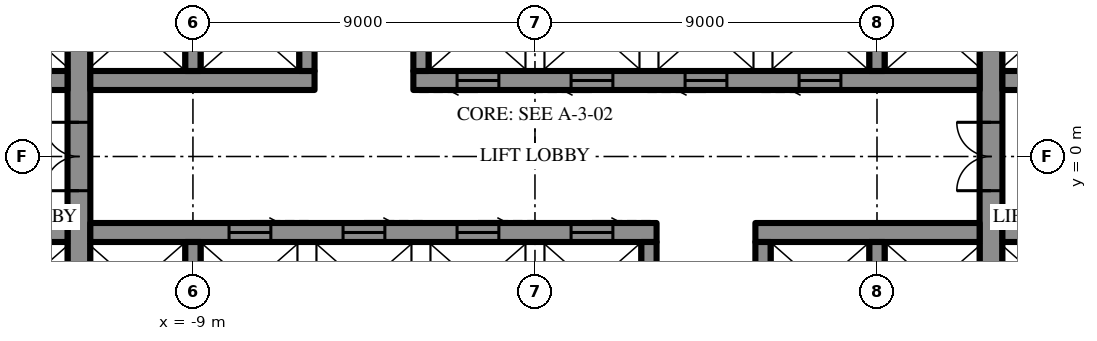
"""IFC4 building model, lengths in metres.
Left out: names, types, materials, properties, quantities, classifications, styles, units other than length and angle.
Written with IfcOpenShell. Run it as: python <this file> out.ifc"""

import sys

from ifc_helpers import new_model, si_unit, direction, frame, frame_2d, origin, place, context, subcontext, project, spatial, rectangle, extrude, element, fill, save


model = new_model("IFC4")
c1 = context("Model", 3, precision=1e-05, world=origin(), true_north=direction((0.0, 1.0)))
c2 = subcontext(c1, "Body", "Model", "MODEL_VIEW")
j1 = project(units=[si_unit("LENGTHUNIT", "METRE"), si_unit("PLANEANGLEUNIT", "RADIAN")], contexts=[c1])
p1 = place(None, origin())
s1 = spatial("IfcSite", under=j1, at=p1, CompositionType="ELEMENT")
p2 = place(p1, origin())
s2 = spatial("IfcBuilding", under=s1, at=p2, CompositionType="ELEMENT")
p3 = place(p2, frame((0.0, 0.0, 169.9)))
s3 = spatial("IfcBuildingStorey", under=s2, at=p3, CompositionType="ELEMENT", Elevation=169.9)
p4 = place(p3, frame((12.0, -10.7, 0.0), z_axis=(0.0, 0.0, 1.0), x_axis=(0.0, 1.0, 0.0)))
e1 = element("IfcWall", 1, at=p4, inside=s3, PredefinedType="SHEAR", context=c2, shape_type="SweptSolid", body=[
    extrude(rectangle(XDim=21.4, YDim=0.6, at=frame_2d((10.7, 0.0))), origin(), (0.0, 0.0, 1.0), 4.2),
])
p5 = place(p4, frame((9.8, 0.0, 0.0)))
e2 = element("IfcOpeningElement", 2, at=p5, cuts=e1, PredefinedType="OPENING", context=c2, shape_type="SweptSolid", body=[
    extrude(rectangle(XDim=1.8, YDim=2.4, at=frame_2d((0.9, 1.2))), frame((0.0, 0.31, 0.0), z_axis=(0.0, -1.0, 0.0), x_axis=(1.0, 0.0, 0.0)), (0.0, 0.0, 1.0), 0.62),
])
p6 = place(p3, frame((-12.0, -10.7, 0.0), z_axis=(0.0, 0.0, 1.0), x_axis=(0.0, 1.0, 0.0)))
e3 = element("IfcWall", 3, at=p6, inside=s3, PredefinedType="SHEAR", context=c2, shape_type="SweptSolid", body=[
    extrude(rectangle(XDim=21.4, YDim=0.6, at=frame_2d((10.7, 0.0))), origin(), (0.0, 0.0, 1.0), 4.2),
])
p7 = place(p6, frame((9.8, 0.0, 0.0)))
e4 = element("IfcOpeningElement", 4, at=p7, cuts=e3, PredefinedType="OPENING", context=c2, shape_type="SweptSolid", body=[
    extrude(rectangle(XDim=1.8, YDim=2.4, at=frame_2d((0.9, 1.2))), frame((0.0, 0.31, 0.0), z_axis=(0.0, -1.0, 0.0), x_axis=(1.0, 0.0, 0.0)), (0.0, 0.0, 1.0), 0.62),
])
p8 = place(p3, frame((-14.7, 2.0, 0.0), z_axis=(0.0, 0.0, 1.0), x_axis=(1.0, 0.0, 0.0)))
e5 = element("IfcWall", 5, at=p8, inside=s3, PredefinedType="SHEAR", context=c2, shape_type="SweptSolid", body=[
    extrude(rectangle(XDim=2.4, YDim=0.5, at=frame_2d((1.2, 0.0))), origin(), (0.0, 0.0, 1.0), 4.2),
])
p9 = place(p3, frame((-11.7, 2.0, 0.0), z_axis=(0.0, 0.0, 1.0), x_axis=(1.0, 0.0, 0.0)))
e6 = element("IfcWall", 6, at=p9, inside=s3, PredefinedType="SHEAR", context=c2, shape_type="SweptSolid", body=[
    extrude(rectangle(XDim=5.9, YDim=0.5, at=frame_2d((2.95, 0.0))), origin(), (0.0, 0.0, 1.0), 4.2),
])
p10 = place(p3, frame((-3.2, 2.0, 0.0), z_axis=(0.0, 0.0, 1.0), x_axis=(1.0, 0.0, 0.0)))
e7 = element("IfcWall", 7, at=p10, inside=s3, PredefinedType="SHEAR", context=c2, shape_type="SweptSolid", body=[
    extrude(rectangle(XDim=14.9, YDim=0.5, at=frame_2d((7.45, 0.0))), origin(), (0.0, 0.0, 1.0), 4.2),
])
p11 = place(p10, frame((1.15, 0.0, 0.0)))
e8 = element("IfcOpeningElement", 8, at=p11, cuts=e7, PredefinedType="OPENING", context=c2, shape_type="SweptSolid", body=[
    extrude(rectangle(XDim=1.1, YDim=2.2, at=frame_2d((0.55, 1.1))), frame((0.0, 0.26, 0.0), z_axis=(0.0, -1.0, 0.0), x_axis=(1.0, 0.0, 0.0)), (0.0, 0.0, 1.0), 0.52),
])
p12 = place(p10, frame((4.15, 0.0, 0.0)))
e9 = element("IfcOpeningElement", 9, at=p12, cuts=e7, PredefinedType="OPENING", context=c2, shape_type="SweptSolid", body=[
    extrude(rectangle(XDim=1.1, YDim=2.2, at=frame_2d((0.55, 1.1))), frame((0.0, 0.26, 0.0), z_axis=(0.0, -1.0, 0.0), x_axis=(1.0, 0.0, 0.0)), (0.0, 0.0, 1.0), 0.52),
])
p13 = place(p10, frame((7.15, 0.0, 0.0)))
e10 = element("IfcOpeningElement", 10, at=p13, cuts=e7, PredefinedType="OPENING", context=c2, shape_type="SweptSolid", body=[
    extrude(rectangle(XDim=1.1, YDim=2.2, at=frame_2d((0.55, 1.1))), frame((0.0, 0.26, 0.0), z_axis=(0.0, -1.0, 0.0), x_axis=(1.0, 0.0, 0.0)), (0.0, 0.0, 1.0), 0.52),
])
p14 = place(p10, frame((10.15, 0.0, 0.0)))
e11 = element("IfcOpeningElement", 11, at=p14, cuts=e7, PredefinedType="OPENING", context=c2, shape_type="SweptSolid", body=[
    extrude(rectangle(XDim=1.1, YDim=2.2, at=frame_2d((0.55, 1.1))), frame((0.0, 0.26, 0.0), z_axis=(0.0, -1.0, 0.0), x_axis=(1.0, 0.0, 0.0)), (0.0, 0.0, 1.0), 0.52),
])
p15 = place(p3, frame((12.3, 2.0, 0.0), z_axis=(0.0, 0.0, 1.0), x_axis=(1.0, 0.0, 0.0)))
e12 = element("IfcWall", 12, at=p15, inside=s3, PredefinedType="SHEAR", context=c2, shape_type="SweptSolid", body=[
    extrude(rectangle(XDim=2.4, YDim=0.5, at=frame_2d((1.2, 0.0))), origin(), (0.0, 0.0, 1.0), 4.2),
])
for number, where, z_axis, x_axis in (
    (13, (-9.0, 2.25, 0.0), (0.0, 0.0, 1.0), (0.0, 1.0, 0.0)),
    (14, (-6.0, 2.25, 0.0), (0.0, 0.0, 1.0), (0.0, 1.0, 0.0)),
    (15, (-3.0, 2.25, 0.0), (0.0, 0.0, 1.0), (0.0, 1.0, 0.0)),
    (16, (9.0, 2.25, 0.0), (0.0, 0.0, 1.0), (0.0, 1.0, 0.0)),
):
    element("IfcWall", number, at=place(p3, frame(where, z_axis=z_axis, x_axis=x_axis)), inside=s3, PredefinedType="SHEAR", context=c2, shape_type="SweptSolid", body=[
        extrude(rectangle(XDim=2.3, YDim=0.4, at=frame_2d((1.15, 0.0))), origin(), (0.0, 0.0, 1.0), 4.2),
    ])
p16 = place(p3, frame((14.7, -2.0, 0.0), z_axis=(0.0, 0.0, 1.0), x_axis=(-1.0, 0.0, 0.0)))
e17 = element("IfcWall", 17, at=p16, inside=s3, PredefinedType="SHEAR", context=c2, shape_type="SweptSolid", body=[
    extrude(rectangle(XDim=2.4, YDim=0.5, at=frame_2d((1.2, 0.0))), origin(), (0.0, 0.0, 1.0), 4.2),
])
p17 = place(p3, frame((11.7, -2.0, 0.0), z_axis=(0.0, 0.0, 1.0), x_axis=(-1.0, 0.0, 0.0)))
e18 = element("IfcWall", 18, at=p17, inside=s3, PredefinedType="SHEAR", context=c2, shape_type="SweptSolid", body=[
    extrude(rectangle(XDim=5.9, YDim=0.5, at=frame_2d((2.95, 0.0))), origin(), (0.0, 0.0, 1.0), 4.2),
])
p18 = place(p3, frame((3.2, -2.0, 0.0), z_axis=(0.0, 0.0, 1.0), x_axis=(-1.0, 0.0, 0.0)))
e19 = element("IfcWall", 19, at=p18, inside=s3, PredefinedType="SHEAR", context=c2, shape_type="SweptSolid", body=[
    extrude(rectangle(XDim=14.9, YDim=0.5, at=frame_2d((7.45, 0.0))), origin(), (0.0, 0.0, 1.0), 4.2),
])
p19 = place(p18, frame((1.15, 0.0, 0.0)))
e20 = element("IfcOpeningElement", 20, at=p19, cuts=e19, PredefinedType="OPENING", context=c2, shape_type="SweptSolid", body=[
    extrude(rectangle(XDim=1.1, YDim=2.2, at=frame_2d((0.55, 1.1))), frame((0.0, 0.26, 0.0), z_axis=(0.0, -1.0, 0.0), x_axis=(1.0, 0.0, 0.0)), (0.0, 0.0, 1.0), 0.52),
])
p20 = place(p18, frame((4.15, 0.0, 0.0)))
e21 = element("IfcOpeningElement", 21, at=p20, cuts=e19, PredefinedType="OPENING", context=c2, shape_type="SweptSolid", body=[
    extrude(rectangle(XDim=1.1, YDim=2.2, at=frame_2d((0.55, 1.1))), frame((0.0, 0.26, 0.0), z_axis=(0.0, -1.0, 0.0), x_axis=(1.0, 0.0, 0.0)), (0.0, 0.0, 1.0), 0.52),
])
p21 = place(p18, frame((7.15, 0.0, 0.0)))
e22 = element("IfcOpeningElement", 22, at=p21, cuts=e19, PredefinedType="OPENING", context=c2, shape_type="SweptSolid", body=[
    extrude(rectangle(XDim=1.1, YDim=2.2, at=frame_2d((0.55, 1.1))), frame((0.0, 0.26, 0.0), z_axis=(0.0, -1.0, 0.0), x_axis=(1.0, 0.0, 0.0)), (0.0, 0.0, 1.0), 0.52),
])
p22 = place(p18, frame((10.15, 0.0, 0.0)))
e23 = element("IfcOpeningElement", 23, at=p22, cuts=e19, PredefinedType="OPENING", context=c2, shape_type="SweptSolid", body=[
    extrude(rectangle(XDim=1.1, YDim=2.2, at=frame_2d((0.55, 1.1))), frame((0.0, 0.26, 0.0), z_axis=(0.0, -1.0, 0.0), x_axis=(1.0, 0.0, 0.0)), (0.0, 0.0, 1.0), 0.52),
])
p23 = place(p3, frame((-12.3, -2.0, 0.0), z_axis=(0.0, 0.0, 1.0), x_axis=(-1.0, 0.0, 0.0)))
e24 = element("IfcWall", 24, at=p23, inside=s3, PredefinedType="SHEAR", context=c2, shape_type="SweptSolid", body=[
    extrude(rectangle(XDim=2.4, YDim=0.5, at=frame_2d((1.2, 0.0))), origin(), (0.0, 0.0, 1.0), 4.2),
])
for number, where, z_axis, x_axis in (
    (25, (9.0, -2.25, 0.0), (0.0, 0.0, 1.0), (0.0, -1.0, 0.0)),
    (26, (6.0, -2.25, 0.0), (0.0, 0.0, 1.0), (0.0, -1.0, 0.0)),
    (27, (3.0, -2.25, 0.0), (0.0, 0.0, 1.0), (0.0, -1.0, 0.0)),
    (28, (-9.0, -2.25, 0.0), (0.0, 0.0, 1.0), (0.0, -1.0, 0.0)),
):
    element("IfcWall", number, at=place(p3, frame(where, z_axis=z_axis, x_axis=x_axis)), inside=s3, PredefinedType="SHEAR", context=c2, shape_type="SweptSolid", body=[
        extrude(rectangle(XDim=2.3, YDim=0.4, at=frame_2d((1.15, 0.0))), origin(), (0.0, 0.0, 1.0), 4.2),
    ])
p24 = place(p5, origin())
e29 = element("IfcDoor", 29, at=p24, inside=s3, OperationType="DOUBLE_DOOR_SINGLE_SWING", PredefinedType="DOOR", context=c2, shape_type="SweptSolid", body=[
    extrude(rectangle(XDim=1.8, YDim=2.4, at=frame_2d((0.9, 1.2))), frame((0.0, 0.025, 0.0), z_axis=(0.0, -1.0, 0.0), x_axis=(1.0, 0.0, 0.0)), (0.0, 0.0, 1.0), 0.05),
])
fill(e2, e29)
p25 = place(p7, origin())
e30 = element("IfcDoor", 30, at=p25, inside=s3, OperationType="DOUBLE_DOOR_SINGLE_SWING", PredefinedType="DOOR", context=c2, shape_type="SweptSolid", body=[
    extrude(rectangle(XDim=1.8, YDim=2.4, at=frame_2d((0.9, 1.2))), frame((0.0, 0.025, 0.0), z_axis=(0.0, -1.0, 0.0), x_axis=(1.0, 0.0, 0.0)), (0.0, 0.0, 1.0), 0.05),
])
fill(e4, e30)
p26 = place(p11, frame((1.1, 0.0, 0.0), z_axis=(0.0, 0.0, 1.0), x_axis=(-1.0, 0.0, 0.0)))
e31 = element("IfcDoor", 31, at=p26, inside=s3, OperationType="SLIDING_TO_LEFT", PredefinedType="DOOR", context=c2, shape_type="SweptSolid", body=[
    extrude(rectangle(XDim=1.1, YDim=2.2, at=frame_2d((0.55, 1.1))), frame((0.0, 0.025, 0.0), z_axis=(0.0, -1.0, 0.0), x_axis=(1.0, 0.0, 0.0)), (0.0, 0.0, 1.0), 0.05),
])
fill(e8, e31)
p27 = place(p12, frame((1.1, 0.0, 0.0), z_axis=(0.0, 0.0, 1.0), x_axis=(-1.0, 0.0, 0.0)))
e32 = element("IfcDoor", 32, at=p27, inside=s3, OperationType="SLIDING_TO_LEFT", PredefinedType="DOOR", context=c2, shape_type="SweptSolid", body=[
    extrude(rectangle(XDim=1.1, YDim=2.2, at=frame_2d((0.55, 1.1))), frame((0.0, 0.025, 0.0), z_axis=(0.0, -1.0, 0.0), x_axis=(1.0, 0.0, 0.0)), (0.0, 0.0, 1.0), 0.05),
])
fill(e9, e32)
p28 = place(p13, frame((1.1, 0.0, 0.0), z_axis=(0.0, 0.0, 1.0), x_axis=(-1.0, 0.0, 0.0)))
e33 = element("IfcDoor", 33, at=p28, inside=s3, OperationType="SLIDING_TO_LEFT", PredefinedType="DOOR", context=c2, shape_type="SweptSolid", body=[
    extrude(rectangle(XDim=1.1, YDim=2.2, at=frame_2d((0.55, 1.1))), frame((0.0, 0.025, 0.0), z_axis=(0.0, -1.0, 0.0), x_axis=(1.0, 0.0, 0.0)), (0.0, 0.0, 1.0), 0.05),
])
fill(e10, e33)
p29 = place(p14, frame((1.1, 0.0, 0.0), z_axis=(0.0, 0.0, 1.0), x_axis=(-1.0, 0.0, 0.0)))
e34 = element("IfcDoor", 34, at=p29, inside=s3, OperationType="SLIDING_TO_LEFT", PredefinedType="DOOR", context=c2, shape_type="SweptSolid", body=[
    extrude(rectangle(XDim=1.1, YDim=2.2, at=frame_2d((0.55, 1.1))), frame((0.0, 0.025, 0.0), z_axis=(0.0, -1.0, 0.0), x_axis=(1.0, 0.0, 0.0)), (0.0, 0.0, 1.0), 0.05),
])
fill(e11, e34)
p30 = place(p19, frame((1.1, 0.0, 0.0), z_axis=(0.0, 0.0, 1.0), x_axis=(-1.0, 0.0, 0.0)))
e35 = element("IfcDoor", 35, at=p30, inside=s3, OperationType="SLIDING_TO_LEFT", PredefinedType="DOOR", context=c2, shape_type="SweptSolid", body=[
    extrude(rectangle(XDim=1.1, YDim=2.2, at=frame_2d((0.55, 1.1))), frame((0.0, 0.025, 0.0), z_axis=(0.0, -1.0, 0.0), x_axis=(1.0, 0.0, 0.0)), (0.0, 0.0, 1.0), 0.05),
])
fill(e20, e35)
p31 = place(p20, frame((1.1, 0.0, 0.0), z_axis=(0.0, 0.0, 1.0), x_axis=(-1.0, 0.0, 0.0)))
e36 = element("IfcDoor", 36, at=p31, inside=s3, OperationType="SLIDING_TO_LEFT", PredefinedType="DOOR", context=c2, shape_type="SweptSolid", body=[
    extrude(rectangle(XDim=1.1, YDim=2.2, at=frame_2d((0.55, 1.1))), frame((0.0, 0.025, 0.0), z_axis=(0.0, -1.0, 0.0), x_axis=(1.0, 0.0, 0.0)), (0.0, 0.0, 1.0), 0.05),
])
fill(e21, e36)
p32 = place(p21, frame((1.1, 0.0, 0.0), z_axis=(0.0, 0.0, 1.0), x_axis=(-1.0, 0.0, 0.0)))
e37 = element("IfcDoor", 37, at=p32, inside=s3, OperationType="SLIDING_TO_LEFT", PredefinedType="DOOR", context=c2, shape_type="SweptSolid", body=[
    extrude(rectangle(XDim=1.1, YDim=2.2, at=frame_2d((0.55, 1.1))), frame((0.0, 0.025, 0.0), z_axis=(0.0, -1.0, 0.0), x_axis=(1.0, 0.0, 0.0)), (0.0, 0.0, 1.0), 0.05),
])
fill(e22, e37)
p33 = place(p22, frame((1.1, 0.0, 0.0), z_axis=(0.0, 0.0, 1.0), x_axis=(-1.0, 0.0, 0.0)))
e38 = element("IfcDoor", 38, at=p33, inside=s3, OperationType="SLIDING_TO_LEFT", PredefinedType="DOOR", context=c2, shape_type="SweptSolid", body=[
    extrude(rectangle(XDim=1.1, YDim=2.2, at=frame_2d((0.55, 1.1))), frame((0.0, 0.025, 0.0), z_axis=(0.0, -1.0, 0.0), x_axis=(1.0, 0.0, 0.0)), (0.0, 0.0, 1.0), 0.05),
])
fill(e23, e38)
save(model, sys.argv[1])
